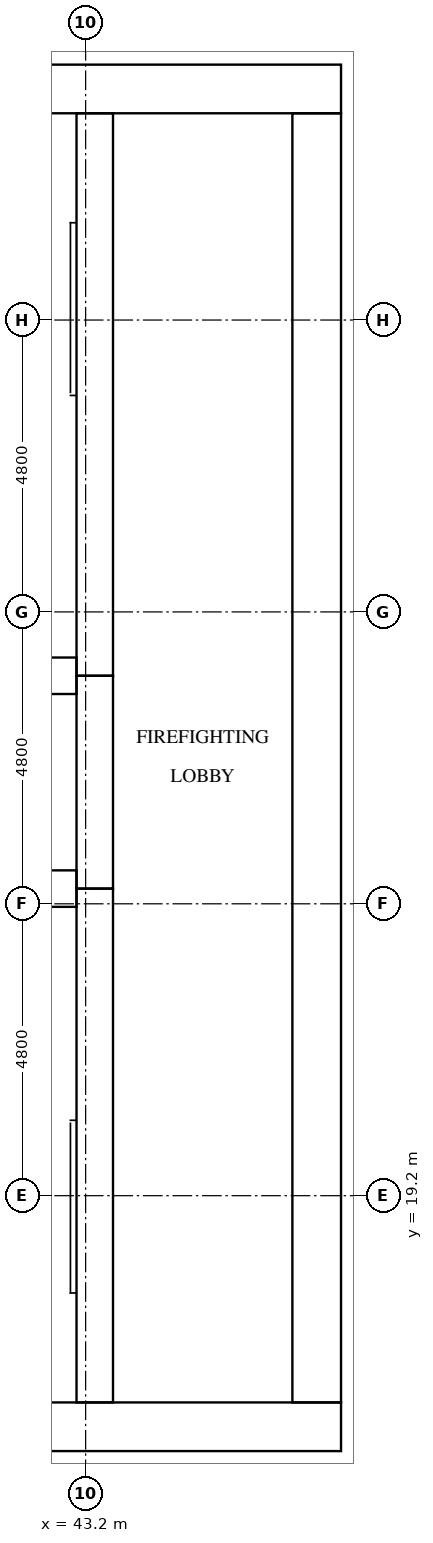
"""IFC4 building model, lengths in metres.
Left out: names, types, materials, properties, quantities, classifications, styles, units other than length and angle.
Written with IfcOpenShell. Run it as: python <this file> out.ifc"""

import sys

from ifc_helpers import new_model, si_unit, direction, frame, frame_2d, origin, place, context, subcontext, project, spatial, rectangle, extrude, element, fill, save


model = new_model("IFC4")
c1 = context("Model", 3, precision=1e-05, world=origin(), true_north=direction((0.0, 1.0)))
c2 = subcontext(c1, "Body", "Model", "MODEL_VIEW")
j1 = project(units=[si_unit("LENGTHUNIT", "METRE"), si_unit("PLANEANGLEUNIT", "RADIAN")], contexts=[c1])
p1 = place(None, origin())
s1 = spatial("IfcSite", under=j1, at=p1, CompositionType="ELEMENT")
p2 = place(p1, origin())
s2 = spatial("IfcBuilding", under=s1, at=p2, CompositionType="ELEMENT")
p3 = place(p2, frame((0.0, 0.0, 129.6)))
s3 = spatial("IfcBuildingStorey", under=s2, at=p3, CompositionType="ELEMENT", Elevation=129.6)
p4 = place(p3, frame((15.0, 15.4, 0.0), z_axis=(0.0, 0.0, 1.0), x_axis=(1.0, 0.0, 0.0)))
e1 = element("IfcWall", 1, at=p4, inside=s3, PredefinedType="SHEAR", context=c2, shape_type="SweptSolid", body=[
    extrude(rectangle(XDim=32.4, YDim=0.8, at=frame_2d((16.2, 0.0))), origin(), (0.0, 0.0, 1.0), 3.2),
])
p5 = place(p4, frame((15.3, 0.0, 0.0)))
e2 = element("IfcOpeningElement", 2, at=p5, cuts=e1, PredefinedType="OPENING", context=c2, shape_type="SweptSolid", body=[
    extrude(rectangle(XDim=1.8, YDim=2.1, at=frame_2d((0.9, 1.05))), frame((0.0, 0.41, 0.0), z_axis=(0.0, -1.0, 0.0), x_axis=(1.0, 0.0, 0.0)), (0.0, 0.0, 1.0), 0.82),
])
p6 = place(p3, frame((15.0, 37.4, 0.0), z_axis=(0.0, 0.0, 1.0), x_axis=(1.0, 0.0, 0.0)))
e3 = element("IfcWall", 3, at=p6, inside=s3, PredefinedType="SHEAR", context=c2, shape_type="SweptSolid", body=[
    extrude(rectangle(XDim=32.4, YDim=0.8, at=frame_2d((16.2, 0.0))), origin(), (0.0, 0.0, 1.0), 3.2),
])
p7 = place(p6, frame((15.3, 0.0, 0.0)))
e4 = element("IfcOpeningElement", 4, at=p7, cuts=e3, PredefinedType="OPENING", context=c2, shape_type="SweptSolid", body=[
    extrude(rectangle(XDim=1.8, YDim=2.1, at=frame_2d((0.9, 1.05))), frame((0.0, 0.41, 0.0), z_axis=(0.0, -1.0, 0.0), x_axis=(1.0, 0.0, 0.0)), (0.0, 0.0, 1.0), 0.82),
])
p8 = place(p6, frame((1.51, 0.0, 0.0)))
e5 = element("IfcOpeningElement", 5, at=p8, cuts=e3, PredefinedType="OPENING", context=c2, shape_type="SweptSolid", body=[
    extrude(rectangle(XDim=1.0, YDim=2.1, at=frame_2d((0.5, 1.05))), frame((0.0, 0.41, 0.0), z_axis=(0.0, -1.0, 0.0), x_axis=(1.0, 0.0, 0.0)), (0.0, 0.0, 1.0), 0.82),
])
p9 = place(p6, frame((5.11, 0.0, 0.0)))
e6 = element("IfcOpeningElement", 6, at=p9, cuts=e3, PredefinedType="OPENING", context=c2, shape_type="SweptSolid", body=[
    extrude(rectangle(XDim=1.0, YDim=2.1, at=frame_2d((0.5, 1.05))), frame((0.0, 0.41, 0.0), z_axis=(0.0, -1.0, 0.0), x_axis=(1.0, 0.0, 0.0)), (0.0, 0.0, 1.0), 0.82),
])
p10 = place(p3, frame((47.0, 15.8, 0.0), z_axis=(0.0, 0.0, 1.0), x_axis=(0.0, 1.0, 0.0)))
e7 = element("IfcWall", 7, at=p10, inside=s3, PredefinedType="SHEAR", context=c2, shape_type="SweptSolid", body=[
    extrude(rectangle(XDim=21.2, YDim=0.8, at=frame_2d((10.6, 0.0))), origin(), (0.0, 0.0, 1.0), 3.2),
])
p11 = place(p10, frame((10.3, 0.0, 0.0)))
e8 = element("IfcOpeningElement", 8, at=p11, cuts=e7, PredefinedType="OPENING", context=c2, shape_type="SweptSolid", body=[
    extrude(rectangle(XDim=1.2, YDim=2.1, at=frame_2d((0.6, 1.05))), frame((0.0, 0.41, 0.0), z_axis=(0.0, -1.0, 0.0), x_axis=(1.0, 0.0, 0.0)), (0.0, 0.0, 1.0), 0.82),
])
p12 = place(p3, frame((43.35, 15.8, 0.0), z_axis=(0.0, 0.0, 1.0), x_axis=(0.0, 1.0, 0.0)))
e9 = element("IfcWall", 9, at=p12, inside=s3, PredefinedType="SHEAR", context=c2, shape_type="SweptSolid", body=[
    extrude(rectangle(XDim=8.45, YDim=0.6, at=frame_2d((4.225, 0.0))), origin(), (0.0, 0.0, 1.0), 3.2),
])
p13 = place(p12, frame((0.4, 0.0, 0.0)))
e10 = element("IfcOpeningElement", 10, at=p13, cuts=e9, PredefinedType="OPENING", context=c2, shape_type="SweptSolid", body=[
    extrude(rectangle(XDim=1.2, YDim=2.1, at=frame_2d((0.6, 1.05))), frame((0.0, 0.31, 0.0), z_axis=(0.0, -1.0, 0.0), x_axis=(1.0, 0.0, 0.0)), (0.0, 0.0, 1.0), 0.62),
])
p14 = place(p3, frame((43.35, 24.25, 0.0), z_axis=(0.0, 0.0, 1.0), x_axis=(0.0, 1.0, 0.0)))
e11 = element("IfcWall", 11, at=p14, inside=s3, PredefinedType="SHEAR", context=c2, shape_type="SweptSolid", body=[
    extrude(rectangle(XDim=3.5, YDim=0.6, at=frame_2d((1.75, 0.0))), origin(), (0.0, 0.0, 1.0), 3.2),
])
p15 = place(p14, frame((1.2, 0.0, 0.0)))
e12 = element("IfcOpeningElement", 12, at=p15, cuts=e11, PredefinedType="OPENING", context=c2, shape_type="SweptSolid", body=[
    extrude(rectangle(XDim=1.1, YDim=2.1, at=frame_2d((0.55, 1.05))), frame((0.0, 0.31, 0.0), z_axis=(0.0, -1.0, 0.0), x_axis=(1.0, 0.0, 0.0)), (0.0, 0.0, 1.0), 0.62),
])
p16 = place(p3, frame((43.35, 27.75, 0.0), z_axis=(0.0, 0.0, 1.0), x_axis=(0.0, 1.0, 0.0)))
e13 = element("IfcWall", 13, at=p16, inside=s3, PredefinedType="SHEAR", context=c2, shape_type="SweptSolid", body=[
    extrude(rectangle(XDim=9.25, YDim=0.6, at=frame_2d((4.625, 0.0))), origin(), (0.0, 0.0, 1.0), 3.2),
])
p17 = place(p16, frame((7.65, 0.0, 0.0)))
e14 = element("IfcOpeningElement", 14, at=p17, cuts=e13, PredefinedType="OPENING", context=c2, shape_type="SweptSolid", body=[
    extrude(rectangle(XDim=1.2, YDim=2.1, at=frame_2d((0.6, 1.05))), frame((0.0, 0.31, 0.0), z_axis=(0.0, -1.0, 0.0), x_axis=(1.0, 0.0, 0.0)), (0.0, 0.0, 1.0), 0.62),
])
for number, where, z_axis, x_axis in (
    (15, (39.6, 24.25, 0.0), (0.0, 0.0, 1.0), (1.0, 0.0, 0.0)),
    (16, (39.6, 27.75, 0.0), (0.0, 0.0, 1.0), (1.0, 0.0, 0.0)),
):
    element("IfcWall", number, at=place(p3, frame(where, z_axis=z_axis, x_axis=x_axis)), inside=s3, PredefinedType="SHEAR", context=c2, shape_type="SweptSolid", body=[
        extrude(rectangle(XDim=3.45, YDim=0.6, at=frame_2d((1.725, 0.0))), origin(), (0.0, 0.0, 1.0), 3.2),
    ])
p18 = place(p15, origin())
e17 = element("IfcDoor", 17, at=p18, inside=s3, OperationType="DOUBLE_DOOR_SLIDING", PredefinedType="DOOR", context=c2, shape_type="SweptSolid", body=[
    extrude(rectangle(XDim=1.1, YDim=2.1, at=frame_2d((0.55, 1.05))), frame((0.0, 0.025, 0.0), z_axis=(0.0, -1.0, 0.0), x_axis=(1.0, 0.0, 0.0)), (0.0, 0.0, 1.0), 0.05),
])
fill(e12, e17)
p19 = place(p13, origin())
e18 = element("IfcDoor", 18, at=p19, inside=s3, OperationType="SINGLE_SWING_RIGHT", PredefinedType="DOOR", context=c2, shape_type="SweptSolid", body=[
    extrude(rectangle(XDim=1.2, YDim=2.1, at=frame_2d((0.6, 1.05))), frame((0.0, 0.025, 0.0), z_axis=(0.0, -1.0, 0.0), x_axis=(1.0, 0.0, 0.0)), (0.0, 0.0, 1.0), 0.05),
])
fill(e10, e18)
p20 = place(p17, origin())
e19 = element("IfcDoor", 19, at=p20, inside=s3, OperationType="SINGLE_SWING_LEFT", PredefinedType="DOOR", context=c2, shape_type="SweptSolid", body=[
    extrude(rectangle(XDim=1.2, YDim=2.1, at=frame_2d((0.6, 1.05))), frame((0.0, 0.025, 0.0), z_axis=(0.0, -1.0, 0.0), x_axis=(1.0, 0.0, 0.0)), (0.0, 0.0, 1.0), 0.05),
])
fill(e14, e19)
p21 = place(p11, origin())
e20 = element("IfcDoor", 20, at=p21, inside=s3, OperationType="SINGLE_SWING_LEFT", PredefinedType="DOOR", context=c2, shape_type="SweptSolid", body=[
    extrude(rectangle(XDim=1.2, YDim=2.1, at=frame_2d((0.6, 1.05))), frame((0.0, 0.025, 0.0), z_axis=(0.0, -1.0, 0.0), x_axis=(1.0, 0.0, 0.0)), (0.0, 0.0, 1.0), 0.05),
])
fill(e8, e20)
save(model, sys.argv[1])
